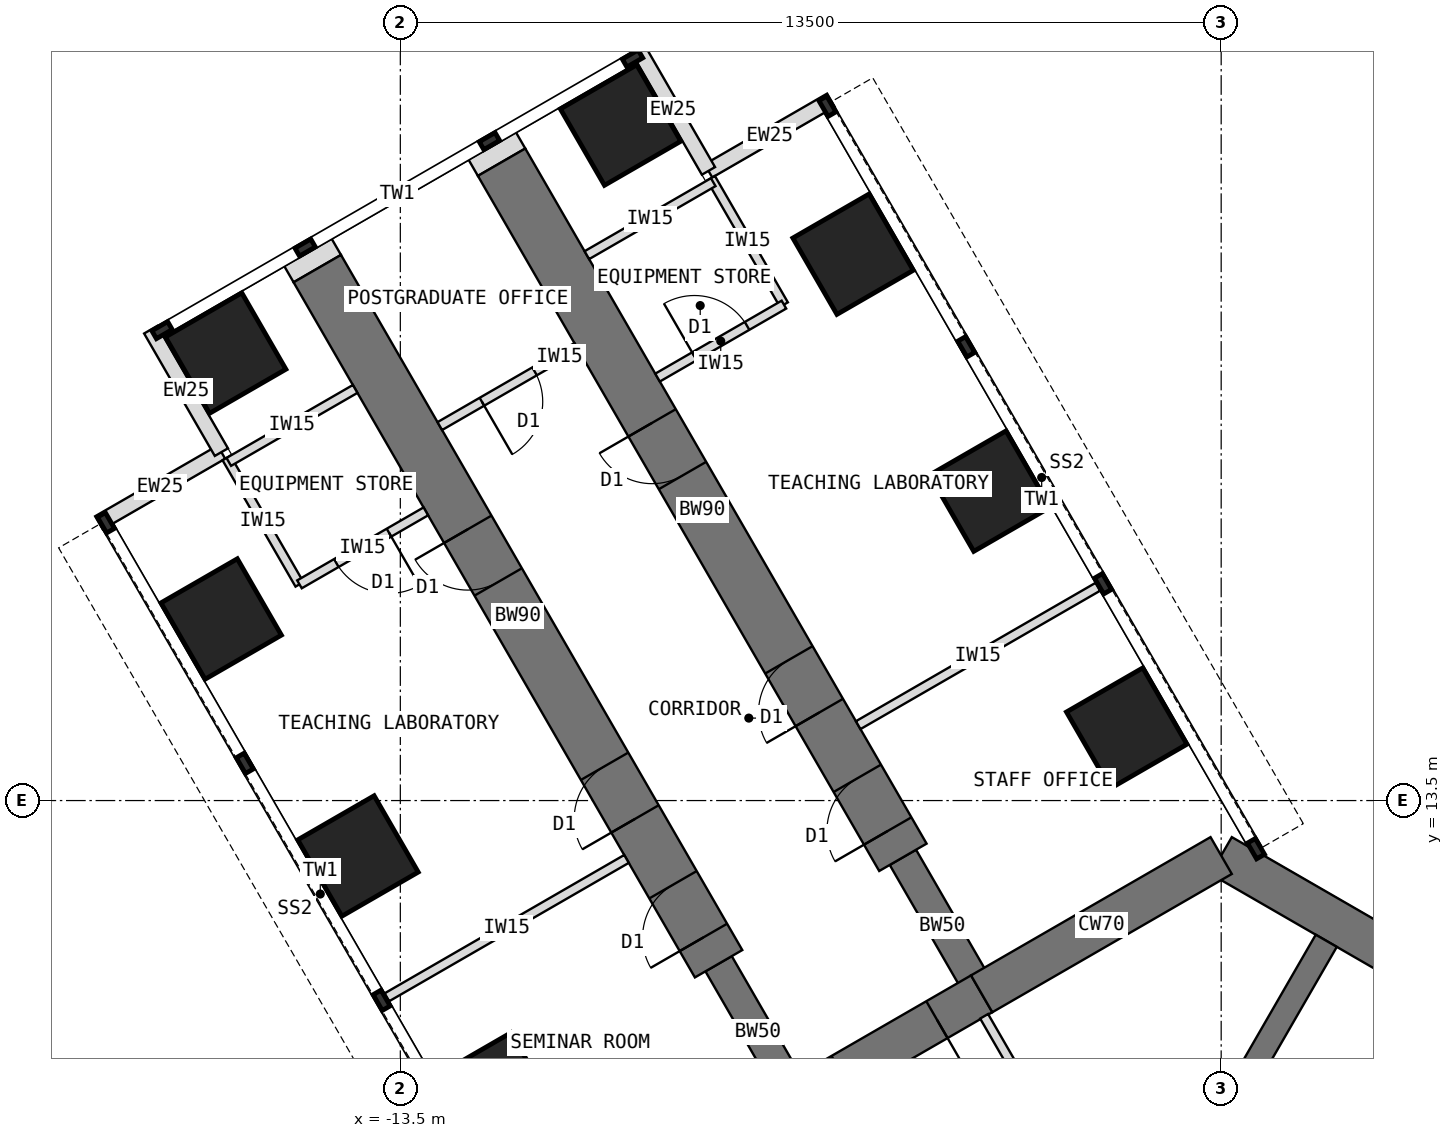
"""IFC4 building model, lengths in metres.
Left out: names, types, materials, properties, quantities, classifications, styles, units other than length and angle.
Written with IfcOpenShell. Run it as: python <this file> out.ifc"""

import sys

from ifc_helpers import new_model, si_unit, direction, frame, frame_2d, origin, origin_2d, place, context, subcontext, project, spatial, rectangle, extrude, element, fill, save


model = new_model("IFC4")
c1 = context("Model", 3, precision=1e-05, world=origin(), true_north=direction((0.0, 1.0)))
c2 = subcontext(c1, "Body", "Model", "MODEL_VIEW")
j1 = project(units=[si_unit("LENGTHUNIT", "METRE"), si_unit("PLANEANGLEUNIT", "RADIAN")], contexts=[c1])
p1 = place(None, origin())
s1 = spatial("IfcSite", under=j1, at=p1, CompositionType="ELEMENT")
p2 = place(p1, origin())
s2 = spatial("IfcBuilding", under=s1, at=p2, CompositionType="ELEMENT")
p3 = place(p2, frame((0.0, 0.0, 52.5)))
s3 = spatial("IfcBuildingStorey", under=s2, at=p3, CompositionType="ELEMENT", Elevation=52.5)
p4 = place(p3, frame((10.908, 6.298, 0.0), z_axis=(0.0, 0.0, 1.0), x_axis=(-0.866021940709, 0.500005998175, 0.0)))
e1 = element("IfcWall", 1, at=p4, inside=s3, PredefinedType="SHEAR", context=c2, shape_type="SweptSolid", body=[
    extrude(rectangle(XDim=12.596, YDim=0.7, at=frame_2d((6.298, 0.0))), origin(), (0.0, 0.0, 1.0), 4.0),
])
p5 = place(p3, frame((0.0, 12.596, 0.0), z_axis=(0.0, 0.0, 1.0), x_axis=(-0.866011268655, -0.500024481964, 0.0)))
e2 = element("IfcWall", 2, at=p5, inside=s3, PredefinedType="SHEAR", context=c2, shape_type="SweptSolid", body=[
    extrude(rectangle(XDim=4.548, YDim=0.7, at=frame_2d((2.274, 0.0))), origin(), (0.0, 0.0, 1.0), 4.0),
])
p6 = place(p3, frame((-3.939, 10.322, 0.0), z_axis=(0.0, 0.0, 1.0), x_axis=(-0.866019471182, -0.500010275428, 0.0)))
e3 = element("IfcWall", 3, at=p6, inside=s3, PredefinedType="SHEAR", context=c2, shape_type="SweptSolid", body=[
    extrude(rectangle(XDim=3.5, YDim=0.7, at=frame_2d((1.75, 0.0))), origin(), (0.0, 0.0, 1.0), 4.0),
])
p7 = place(p6, frame((0.85, 0.0, 0.0)))
e4 = element("IfcOpeningElement", 4, at=p7, cuts=e3, PredefinedType="OPENING", context=c2, shape_type="SweptSolid", body=[
    extrude(rectangle(XDim=1.8, YDim=2.1, at=frame_2d((0.9, 1.05))), frame((0.0, 0.36, 0.0), z_axis=(0.0, -1.0, 0.0), x_axis=(1.0, 0.0, 0.0)), (0.0, 0.0, 1.0), 0.72),
])
p8 = place(p3, frame((-6.97, 8.572, 0.0), z_axis=(0.0, 0.0, 1.0), x_axis=(-0.499988811324, 0.866031863473, 0.0)))
e5 = element("IfcWall", 5, at=p8, inside=s3, PredefinedType="SHEAR", context=c2, shape_type="SweptSolid", body=[
    extrude(rectangle(XDim=2.592, YDim=0.5, at=frame_2d((1.296, 0.0))), origin(), (0.0, 0.0, 1.0), 4.0),
])
p9 = place(p3, frame((-8.266, 10.816, 0.0), z_axis=(0.0, 0.0, 1.0), x_axis=(-0.499996231654, 0.866027579429, 0.0)))
e6 = element("IfcWall", 6, at=p9, inside=s3, PredefinedType="SHEAR", context=c2, shape_type="SweptSolid", body=[
    extrude(rectangle(XDim=13.2, YDim=0.9, at=frame_2d((6.6, 0.0))), origin(), (0.0, 0.0, 1.0), 4.0),
])
p10 = place(p9, frame((0.5, 0.0, 0.0)))
e7 = element("IfcOpeningElement", 7, at=p10, cuts=e6, PredefinedType="OPENING", context=c2, shape_type="SweptSolid", body=[
    extrude(rectangle(XDim=1.0, YDim=2.1, at=frame_2d((0.5, 1.05))), frame((0.0, 0.46, 0.0), z_axis=(0.0, -1.0, 0.0), x_axis=(1.0, 0.0, 0.0)), (0.0, 0.0, 1.0), 0.92),
])
p11 = place(p9, frame((2.75, 0.0, 0.0)))
e8 = element("IfcOpeningElement", 8, at=p11, cuts=e6, PredefinedType="OPENING", context=c2, shape_type="SweptSolid", body=[
    extrude(rectangle(XDim=1.0, YDim=2.1, at=frame_2d((0.5, 1.05))), frame((0.0, 0.46, 0.0), z_axis=(0.0, -1.0, 0.0), x_axis=(1.0, 0.0, 0.0)), (0.0, 0.0, 1.0), 0.92),
])
p12 = place(p9, frame((7.25, 0.0, 0.0)))
e9 = element("IfcOpeningElement", 9, at=p12, cuts=e6, PredefinedType="OPENING", context=c2, shape_type="SweptSolid", body=[
    extrude(rectangle(XDim=1.0, YDim=2.1, at=frame_2d((0.5, 1.05))), frame((0.0, 0.46, 0.0), z_axis=(0.0, -1.0, 0.0), x_axis=(1.0, 0.0, 0.0)), (0.0, 0.0, 1.0), 0.92),
])
p13 = place(p3, frame((-3.939, 10.322, 0.0), z_axis=(0.0, 0.0, 1.0), x_axis=(-0.499918158782, 0.866072649678, 0.0)))
e10 = element("IfcWall", 10, at=p13, inside=s3, PredefinedType="SHEAR", context=c2, shape_type="SweptSolid", body=[
    extrude(rectangle(XDim=2.592, YDim=0.5, at=frame_2d((1.296, 0.0))), origin(), (0.0, 0.0, 1.0), 4.0),
])
p14 = place(p3, frame((-5.234, 12.566, 0.0), z_axis=(0.0, 0.0, 1.0), x_axis=(-0.500010103361, 0.866019570528, 0.0)))
e11 = element("IfcWall", 11, at=p14, inside=s3, PredefinedType="SHEAR", context=c2, shape_type="SweptSolid", body=[
    extrude(rectangle(XDim=13.2, YDim=0.9, at=frame_2d((6.6, 0.0))), origin(), (0.0, 0.0, 1.0), 4.0),
])
p15 = place(p14, frame((0.5, 0.0, 0.0)))
e12 = element("IfcOpeningElement", 12, at=p15, cuts=e11, PredefinedType="OPENING", context=c2, shape_type="SweptSolid", body=[
    extrude(rectangle(XDim=1.0, YDim=2.1, at=frame_2d((0.5, 1.05))), frame((0.0, 0.46, 0.0), z_axis=(0.0, -1.0, 0.0), x_axis=(1.0, 0.0, 0.0)), (0.0, 0.0, 1.0), 0.92),
])
p16 = place(p14, frame((2.75, 0.0, 0.0)))
e13 = element("IfcOpeningElement", 13, at=p16, cuts=e11, PredefinedType="OPENING", context=c2, shape_type="SweptSolid", body=[
    extrude(rectangle(XDim=1.0, YDim=2.1, at=frame_2d((0.5, 1.05))), frame((0.0, 0.46, 0.0), z_axis=(0.0, -1.0, 0.0), x_axis=(1.0, 0.0, 0.0)), (0.0, 0.0, 1.0), 0.92),
])
p17 = place(p14, frame((7.25, 0.0, 0.0)))
e14 = element("IfcOpeningElement", 14, at=p17, cuts=e11, PredefinedType="OPENING", context=c2, shape_type="SweptSolid", body=[
    extrude(rectangle(XDim=1.0, YDim=2.1, at=frame_2d((0.5, 1.05))), frame((0.0, 0.46, 0.0), z_axis=(0.0, -1.0, 0.0), x_axis=(1.0, 0.0, 0.0)), (0.0, 0.0, 1.0), 0.92),
])
for number, where, z_axis, x_axis in (
    (15, (-11.946, 8.691, 0.0), (0.0, 0.0, 1.0), (0.866, 0.5, 0.0)),
    (16, (-1.554, 14.691, 0.0), (0.0, 0.0, 1.0), (0.866, 0.5, 0.0)),
    (17, (-14.196, 12.588, 0.0), (0.0, 0.0, 1.0), (0.866, 0.5, 0.0)),
    (18, (-3.804, 18.588, 0.0), (0.0, 0.0, 1.0), (0.866, 0.5, 0.0)),
    (19, (-16.446, 16.486, 0.0), (0.0, 0.0, 1.0), (0.866, 0.5, 0.0)),
    (20, (-6.054, 22.486, 0.0), (0.0, 0.0, 1.0), (0.866, 0.5, 0.0)),
    (21, (-16.373, 20.858, 0.0), (0.0, 0.0, 1.0), (0.866, 0.5, 0.0)),
    (22, (-9.877, 24.608, 0.0), (0.0, 0.0, 1.0), (0.866, 0.5, 0.0)),
):
    element("IfcColumn", number, at=place(p3, frame(where, z_axis=z_axis, x_axis=x_axis)), inside=s3, PredefinedType="COLUMN", context=c2, shape_type="SweptSolid", body=[
        extrude(rectangle(XDim=1.45, YDim=1.45, at=origin_2d()), origin(), (0.0, 0.0, 1.0), 4.0),
    ])
for number, where, z_axis, x_axis in (
    (23, (-18.456, 18.067, 0.0), (0.0, 0.0, 1.0), (0.866, 0.5, 0.0)),
    (24, (-16.443, 19.23, 0.0), (0.0, 0.0, 1.0), (-0.5, 0.866, 0.0)),
    (25, (-6.419, 25.017, 0.0), (0.0, 0.0, 1.0), (-0.866, -0.5, 0.0)),
    (26, (-8.432, 23.855, 0.0), (0.0, 0.0, 1.0), (-0.5, 0.866, 0.0)),
):
    element("IfcWall", number, at=place(p3, frame(where, z_axis=z_axis, x_axis=x_axis)), inside=s3, PredefinedType="STANDARD", context=c2, shape_type="SweptSolid", body=[
        extrude(rectangle(XDim=2.325, YDim=0.25, at=frame_2d((1.163, 0.0))), origin(), (0.0, 0.0, 1.0), 3.8),
    ])
for number, where, z_axis, x_axis in (
    (27, (-14.865, 22.248, 0.0), (0.0, 0.0, 1.0), (-0.5, 0.866, 0.0)),
    (28, (-11.834, 23.998, 0.0), (0.0, 0.0, 1.0), (-0.5, 0.866, 0.0)),
):
    element("IfcWall", number, at=place(p3, frame(where, z_axis=z_axis, x_axis=x_axis)), inside=s3, PredefinedType="PARTITIONING", context=c2, shape_type="SweptSolid", body=[
        extrude(rectangle(XDim=0.31, YDim=0.9, at=frame_2d((0.155, 0.0))), origin(), (0.0, 0.0, 1.0), 3.8),
    ])
p18 = place(p3, frame((-1.201, 6.12, 0.0), z_axis=(0.0, 0.0, 1.0), x_axis=(0.500002627198, 0.866023886965, 0.0)))
e29 = element("IfcWall", 29, at=p18, inside=s3, PredefinedType="SHEAR", context=c2, shape_type="SweptSolid", body=[
    extrude(rectangle(XDim=5.858, YDim=0.4, at=frame_2d((2.929, 0.0))), origin(), (0.0, 0.0, 1.0), 4.0),
])
p19 = place(p3, frame((-9.78, 12.54, 0.0), z_axis=(0.0, 0.0, 1.0), x_axis=(-0.866035472144, -0.499982560684, 0.0)))
e30 = element("IfcWall", 30, at=p19, inside=s3, PredefinedType="PARTITIONING", context=c2, shape_type="SweptSolid", body=[
    extrude(rectangle(XDim=4.55, YDim=0.15, at=frame_2d((2.275, 0.0))), origin(), (0.0, 0.0, 1.0), 3.8),
])
p20 = place(p3, frame((-15.159, 17.056, 0.0), z_axis=(0.0, 0.0, 1.0), x_axis=(-0.500001309137, 0.866024647952, 0.0)))
e31 = element("IfcWall", 31, at=p20, inside=s3, PredefinedType="PARTITIONING", context=c2, shape_type="SweptSolid", body=[
    extrude(rectangle(XDim=2.4, YDim=0.15, at=frame_2d((1.2, 0.0))), origin(), (0.0, 0.0, 1.0), 3.8),
])
p21 = place(p3, frame((-13.08, 18.256, 0.0), z_axis=(0.0, 0.0, 1.0), x_axis=(-0.866024647952, -0.500001309137, 0.0)))
e32 = element("IfcWall", 32, at=p21, inside=s3, PredefinedType="PARTITIONING", context=c2, shape_type="SweptSolid", body=[
    extrude(rectangle(XDim=2.4, YDim=0.15, at=frame_2d((1.2, 0.0))), origin(), (0.0, 0.0, 1.0), 3.8),
])
p22 = place(p21, frame((0.7, 0.0, 0.0)))
e33 = element("IfcOpeningElement", 33, at=p22, cuts=e32, PredefinedType="OPENING", context=c2, shape_type="SweptSolid", body=[
    extrude(rectangle(XDim=1.0, YDim=2.1, at=frame_2d((0.5, 1.05))), frame((0.0, 0.085, 0.0), z_axis=(0.0, -1.0, 0.0), x_axis=(1.0, 0.0, 0.0)), (0.0, 0.0, 1.0), 0.17),
])
p23 = place(p3, frame((-14.243, 20.269, 0.0), z_axis=(0.0, 0.0, 1.0), x_axis=(-0.866006032174, -0.500033551112, 0.0)))
e34 = element("IfcWall", 34, at=p23, inside=s3, PredefinedType="PARTITIONING", context=c2, shape_type="SweptSolid", body=[
    extrude(rectangle(XDim=2.4, YDim=0.15, at=frame_2d((1.2, 0.0))), origin(), (0.0, 0.0, 1.0), 3.8),
])
p24 = place(p3, frame((-5.97, 14.74, 0.0), z_axis=(0.0, 0.0, 1.0), x_axis=(0.866035472144, 0.499982560684, 0.0)))
e35 = element("IfcWall", 35, at=p24, inside=s3, PredefinedType="PARTITIONING", context=c2, shape_type="SweptSolid", body=[
    extrude(rectangle(XDim=4.55, YDim=0.15, at=frame_2d((2.275, 0.0))), origin(), (0.0, 0.0, 1.0), 3.8),
])
p25 = place(p3, frame((-7.191, 21.656, 0.0), z_axis=(0.0, 0.0, 1.0), x_axis=(-0.500077600433, 0.865980596518, 0.0)))
e36 = element("IfcWall", 36, at=p25, inside=s3, PredefinedType="PARTITIONING", context=c2, shape_type="SweptSolid", body=[
    extrude(rectangle(XDim=2.4, YDim=0.15, at=frame_2d((1.2, 0.0))), origin(), (0.0, 0.0, 1.0), 3.8),
])
p26 = place(p3, frame((-9.27, 20.456, 0.0), z_axis=(0.0, 0.0, 1.0), x_axis=(0.866006032174, 0.500033551112, 0.0)))
e37 = element("IfcWall", 37, at=p26, inside=s3, PredefinedType="PARTITIONING", context=c2, shape_type="SweptSolid", body=[
    extrude(rectangle(XDim=2.4, YDim=0.15, at=frame_2d((1.2, 0.0))), origin(), (0.0, 0.0, 1.0), 3.8),
])
p27 = place(p26, frame((0.7, 0.0, 0.0)))
e38 = element("IfcOpeningElement", 38, at=p27, cuts=e37, PredefinedType="OPENING", context=c2, shape_type="SweptSolid", body=[
    extrude(rectangle(XDim=1.0, YDim=2.1, at=frame_2d((0.5, 1.05))), frame((0.0, 0.085, 0.0), z_axis=(0.0, -1.0, 0.0), x_axis=(1.0, 0.0, 0.0)), (0.0, 0.0, 1.0), 0.17),
])
p28 = place(p3, frame((-10.432, 22.469, 0.0), z_axis=(0.0, 0.0, 1.0), x_axis=(0.866024647952, 0.500001309137, 0.0)))
e39 = element("IfcWall", 39, at=p28, inside=s3, PredefinedType="PARTITIONING", context=c2, shape_type="SweptSolid", body=[
    extrude(rectangle(XDim=2.4, YDim=0.15, at=frame_2d((1.2, 0.0))), origin(), (0.0, 0.0, 1.0), 3.8),
])
p29 = place(p3, frame((-3.898, 9.952, 0.0), z_axis=(0.0, 0.0, 1.0), x_axis=(0.499999927604, -0.866025445582, 0.0)))
e40 = element("IfcWall", 40, at=p29, inside=s3, PredefinedType="PARTITIONING", context=c2, shape_type="SweptSolid", body=[
    extrude(rectangle(XDim=4.468, YDim=0.15, at=frame_2d((2.234, 0.0))), origin(), (0.0, 0.0, 1.0), 3.8),
])
p30 = place(p29, frame((1.724, 0.0, 0.0)))
e41 = element("IfcOpeningElement", 41, at=p30, cuts=e40, PredefinedType="OPENING", context=c2, shape_type="SweptSolid", body=[
    extrude(rectangle(XDim=1.0, YDim=2.1, at=frame_2d((0.5, 1.05))), frame((0.0, 0.085, 0.0), z_axis=(0.0, -1.0, 0.0), x_axis=(1.0, 0.0, 0.0)), (0.0, 0.0, 1.0), 0.17),
])
p31 = place(p3, frame((-10.599, 20.958, 0.0), z_axis=(0.0, 0.0, 1.0), x_axis=(-0.866021400173, -0.500006934395, 0.0)))
e42 = element("IfcWall", 42, at=p31, inside=s3, PredefinedType="PARTITIONING", context=c2, shape_type="SweptSolid", body=[
    extrude(rectangle(XDim=2.6, YDim=0.15, at=frame_2d((1.3, 0.0))), origin(), (0.0, 0.0, 1.0), 3.8),
])
p32 = place(p31, frame((0.8, 0.0, 0.0)))
e43 = element("IfcOpeningElement", 43, at=p32, cuts=e42, PredefinedType="OPENING", context=c2, shape_type="SweptSolid", body=[
    extrude(rectangle(XDim=1.0, YDim=2.1, at=frame_2d((0.5, 1.05))), frame((0.0, 0.085, 0.0), z_axis=(0.0, -1.0, 0.0), x_axis=(1.0, 0.0, 0.0)), (0.0, 0.0, 1.0), 0.17),
])
p33 = place(p7, origin())
e44 = element("IfcDoor", 44, at=p33, inside=s3, OperationType="DOUBLE_DOOR_DOUBLE_SWING", PredefinedType="DOOR", context=c2, shape_type="SweptSolid", body=[
    extrude(rectangle(XDim=1.72, YDim=2.06, at=frame_2d((0.9, 1.03))), frame((0.0, 0.025, 0.0), z_axis=(0.0, -1.0, 0.0), x_axis=(1.0, 0.0, 0.0)), (0.0, 0.0, 1.0), 0.05),
    extrude(rectangle(XDim=0.04, YDim=2.1, at=frame_2d((0.02, 1.05))), frame((0.0, 0.35, 0.0), z_axis=(0.0, -1.0, 0.0), x_axis=(1.0, 0.0, 0.0)), (0.0, 0.0, 1.0), 0.699),
    extrude(rectangle(XDim=0.04, YDim=2.1, at=frame_2d((1.78, 1.05))), frame((0.0, 0.35, 0.0), z_axis=(0.0, -1.0, 0.0), x_axis=(1.0, 0.0, 0.0)), (0.0, 0.0, 1.0), 0.699),
    extrude(rectangle(XDim=1.72, YDim=0.04, at=frame_2d((0.9, 2.08))), frame((0.0, 0.35, 0.0), z_axis=(0.0, -1.0, 0.0), x_axis=(1.0, 0.0, 0.0)), (0.0, 0.0, 1.0), 0.699),
])
fill(e4, e44)
p34 = place(p22, origin())
e45 = element("IfcDoor", 45, at=p34, inside=s3, OperationType="SINGLE_SWING_LEFT", PredefinedType="DOOR", context=c2, shape_type="SweptSolid", body=[
    extrude(rectangle(XDim=1.0, YDim=2.1, at=frame_2d((0.5, 1.05))), frame((0.0, 0.025, 0.0), z_axis=(0.0, -1.0, 0.0), x_axis=(1.0, 0.0, 0.0)), (0.0, 0.0, 1.0), 0.05),
])
fill(e33, e45)
p35 = place(p27, origin())
e46 = element("IfcDoor", 46, at=p35, inside=s3, OperationType="SINGLE_SWING_LEFT", PredefinedType="DOOR", context=c2, shape_type="SweptSolid", body=[
    extrude(rectangle(XDim=1.0, YDim=2.1, at=frame_2d((0.5, 1.05))), frame((0.0, 0.025, 0.0), z_axis=(0.0, -1.0, 0.0), x_axis=(1.0, 0.0, 0.0)), (0.0, 0.0, 1.0), 0.05),
])
fill(e38, e46)
p36 = place(p32, origin())
e47 = element("IfcDoor", 47, at=p36, inside=s3, OperationType="SINGLE_SWING_RIGHT", PredefinedType="DOOR", context=c2, shape_type="SweptSolid", body=[
    extrude(rectangle(XDim=1.0, YDim=2.1, at=frame_2d((0.5, 1.05))), frame((0.0, 0.025, 0.0), z_axis=(0.0, -1.0, 0.0), x_axis=(1.0, 0.0, 0.0)), (0.0, 0.0, 1.0), 0.05),
])
fill(e43, e47)
p37 = place(p10, origin())
e48 = element("IfcDoor", 48, at=p37, inside=s3, OperationType="SINGLE_SWING_LEFT", PredefinedType="DOOR", context=c2, shape_type="SweptSolid", body=[
    extrude(rectangle(XDim=0.92, YDim=2.06, at=frame_2d((0.5, 1.03))), frame((0.0, 0.025, 0.0), z_axis=(0.0, -1.0, 0.0), x_axis=(1.0, 0.0, 0.0)), (0.0, 0.0, 1.0), 0.05),
    extrude(rectangle(XDim=0.04, YDim=2.1, at=frame_2d((0.02, 1.05))), frame((0.0, 0.45, 0.0), z_axis=(0.0, -1.0, 0.0), x_axis=(1.0, 0.0, 0.0)), (0.0, 0.0, 1.0), 0.899),
    extrude(rectangle(XDim=0.04, YDim=2.1, at=frame_2d((0.98, 1.05))), frame((0.0, 0.45, 0.0), z_axis=(0.0, -1.0, 0.0), x_axis=(1.0, 0.0, 0.0)), (0.0, 0.0, 1.0), 0.899),
    extrude(rectangle(XDim=0.92, YDim=0.04, at=frame_2d((0.5, 2.08))), frame((0.0, 0.45, 0.0), z_axis=(0.0, -1.0, 0.0), x_axis=(1.0, 0.0, 0.0)), (0.0, 0.0, 1.0), 0.899),
])
fill(e7, e48)
p38 = place(p11, origin())
e49 = element("IfcDoor", 49, at=p38, inside=s3, OperationType="SINGLE_SWING_LEFT", PredefinedType="DOOR", context=c2, shape_type="SweptSolid", body=[
    extrude(rectangle(XDim=0.92, YDim=2.06, at=frame_2d((0.5, 1.03))), frame((0.0, 0.025, 0.0), z_axis=(0.0, -1.0, 0.0), x_axis=(1.0, 0.0, 0.0)), (0.0, 0.0, 1.0), 0.05),
    extrude(rectangle(XDim=0.04, YDim=2.1, at=frame_2d((0.02, 1.05))), frame((0.0, 0.45, 0.0), z_axis=(0.0, -1.0, 0.0), x_axis=(1.0, 0.0, 0.0)), (0.0, 0.0, 1.0), 0.899),
    extrude(rectangle(XDim=0.04, YDim=2.1, at=frame_2d((0.98, 1.05))), frame((0.0, 0.45, 0.0), z_axis=(0.0, -1.0, 0.0), x_axis=(1.0, 0.0, 0.0)), (0.0, 0.0, 1.0), 0.899),
    extrude(rectangle(XDim=0.92, YDim=0.04, at=frame_2d((0.5, 2.08))), frame((0.0, 0.45, 0.0), z_axis=(0.0, -1.0, 0.0), x_axis=(1.0, 0.0, 0.0)), (0.0, 0.0, 1.0), 0.899),
])
fill(e8, e49)
p39 = place(p12, origin())
e50 = element("IfcDoor", 50, at=p39, inside=s3, OperationType="SINGLE_SWING_RIGHT", PredefinedType="DOOR", context=c2, shape_type="SweptSolid", body=[
    extrude(rectangle(XDim=0.92, YDim=2.06, at=frame_2d((0.5, 1.03))), frame((0.0, 0.025, 0.0), z_axis=(0.0, -1.0, 0.0), x_axis=(1.0, 0.0, 0.0)), (0.0, 0.0, 1.0), 0.05),
    extrude(rectangle(XDim=0.04, YDim=2.1, at=frame_2d((0.02, 1.05))), frame((0.0, 0.45, 0.0), z_axis=(0.0, -1.0, 0.0), x_axis=(1.0, 0.0, 0.0)), (0.0, 0.0, 1.0), 0.899),
    extrude(rectangle(XDim=0.04, YDim=2.1, at=frame_2d((0.98, 1.05))), frame((0.0, 0.45, 0.0), z_axis=(0.0, -1.0, 0.0), x_axis=(1.0, 0.0, 0.0)), (0.0, 0.0, 1.0), 0.899),
    extrude(rectangle(XDim=0.92, YDim=0.04, at=frame_2d((0.5, 2.08))), frame((0.0, 0.45, 0.0), z_axis=(0.0, -1.0, 0.0), x_axis=(1.0, 0.0, 0.0)), (0.0, 0.0, 1.0), 0.899),
])
fill(e9, e50)
p40 = place(p15, origin())
e51 = element("IfcDoor", 51, at=p40, inside=s3, OperationType="SINGLE_SWING_LEFT", PredefinedType="DOOR", context=c2, shape_type="SweptSolid", body=[
    extrude(rectangle(XDim=0.92, YDim=2.06, at=frame_2d((0.5, 1.03))), frame((0.0, 0.025, 0.0), z_axis=(0.0, -1.0, 0.0), x_axis=(1.0, 0.0, 0.0)), (0.0, 0.0, 1.0), 0.05),
    extrude(rectangle(XDim=0.04, YDim=2.1, at=frame_2d((0.02, 1.05))), frame((0.0, 0.45, 0.0), z_axis=(0.0, -1.0, 0.0), x_axis=(1.0, 0.0, 0.0)), (0.0, 0.0, 1.0), 0.899),
    extrude(rectangle(XDim=0.04, YDim=2.1, at=frame_2d((0.98, 1.05))), frame((0.0, 0.45, 0.0), z_axis=(0.0, -1.0, 0.0), x_axis=(1.0, 0.0, 0.0)), (0.0, 0.0, 1.0), 0.899),
    extrude(rectangle(XDim=0.92, YDim=0.04, at=frame_2d((0.5, 2.08))), frame((0.0, 0.45, 0.0), z_axis=(0.0, -1.0, 0.0), x_axis=(1.0, 0.0, 0.0)), (0.0, 0.0, 1.0), 0.899),
])
fill(e12, e51)
p41 = place(p16, origin())
e52 = element("IfcDoor", 52, at=p41, inside=s3, OperationType="SINGLE_SWING_LEFT", PredefinedType="DOOR", context=c2, shape_type="SweptSolid", body=[
    extrude(rectangle(XDim=0.92, YDim=2.06, at=frame_2d((0.5, 1.03))), frame((0.0, 0.025, 0.0), z_axis=(0.0, -1.0, 0.0), x_axis=(1.0, 0.0, 0.0)), (0.0, 0.0, 1.0), 0.05),
    extrude(rectangle(XDim=0.04, YDim=2.1, at=frame_2d((0.02, 1.05))), frame((0.0, 0.45, 0.0), z_axis=(0.0, -1.0, 0.0), x_axis=(1.0, 0.0, 0.0)), (0.0, 0.0, 1.0), 0.899),
    extrude(rectangle(XDim=0.04, YDim=2.1, at=frame_2d((0.98, 1.05))), frame((0.0, 0.45, 0.0), z_axis=(0.0, -1.0, 0.0), x_axis=(1.0, 0.0, 0.0)), (0.0, 0.0, 1.0), 0.899),
    extrude(rectangle(XDim=0.92, YDim=0.04, at=frame_2d((0.5, 2.08))), frame((0.0, 0.45, 0.0), z_axis=(0.0, -1.0, 0.0), x_axis=(1.0, 0.0, 0.0)), (0.0, 0.0, 1.0), 0.899),
])
fill(e13, e52)
p42 = place(p17, origin())
e53 = element("IfcDoor", 53, at=p42, inside=s3, OperationType="SINGLE_SWING_RIGHT", PredefinedType="DOOR", context=c2, shape_type="SweptSolid", body=[
    extrude(rectangle(XDim=0.92, YDim=2.06, at=frame_2d((0.5, 1.03))), frame((0.0, 0.025, 0.0), z_axis=(0.0, -1.0, 0.0), x_axis=(1.0, 0.0, 0.0)), (0.0, 0.0, 1.0), 0.05),
    extrude(rectangle(XDim=0.04, YDim=2.1, at=frame_2d((0.02, 1.05))), frame((0.0, 0.45, 0.0), z_axis=(0.0, -1.0, 0.0), x_axis=(1.0, 0.0, 0.0)), (0.0, 0.0, 1.0), 0.899),
    extrude(rectangle(XDim=0.04, YDim=2.1, at=frame_2d((0.98, 1.05))), frame((0.0, 0.45, 0.0), z_axis=(0.0, -1.0, 0.0), x_axis=(1.0, 0.0, 0.0)), (0.0, 0.0, 1.0), 0.899),
    extrude(rectangle(XDim=0.92, YDim=0.04, at=frame_2d((0.5, 2.08))), frame((0.0, 0.45, 0.0), z_axis=(0.0, -1.0, 0.0), x_axis=(1.0, 0.0, 0.0)), (0.0, 0.0, 1.0), 0.899),
])
fill(e14, e53)
save(model, sys.argv[1])
